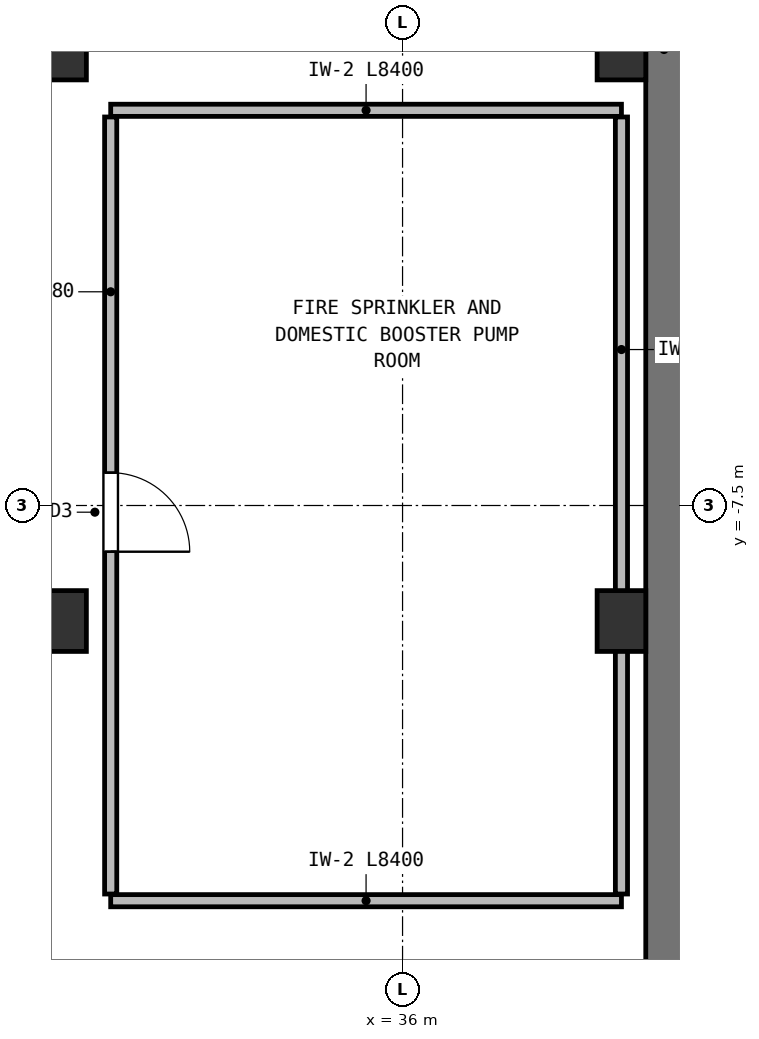
"""IFC4 building model, lengths in metres.
Left out: names, types, materials, properties, quantities, classifications, styles, units other than length and angle.
Written with IfcOpenShell. Run it as: python <this file> out.ifc"""

import sys

from ifc_helpers import new_model, si_unit, direction, frame, frame_2d, origin, origin_2d, place, context, subcontext, project, spatial, rectangle, extrude, element, fill, save


model = new_model("IFC4")
c1 = context("Model", 3, precision=1e-05, world=origin(), true_north=direction((0.0, 1.0)))
c2 = subcontext(c1, "Body", "Model", "MODEL_VIEW")
j1 = project(units=[si_unit("LENGTHUNIT", "METRE"), si_unit("PLANEANGLEUNIT", "RADIAN")], contexts=[c1])
p1 = place(None, origin())
s1 = spatial("IfcSite", under=j1, at=p1, CompositionType="ELEMENT")
p2 = place(p1, origin())
s2 = spatial("IfcBuilding", under=s1, at=p2, CompositionType="ELEMENT")
p3 = place(p2, frame((0.0, 0.0, -13.5)))
s3 = spatial("IfcBuildingStorey", under=s2, at=p3, CompositionType="ELEMENT", Elevation=-13.5)
p4 = place(p3, frame((40.3, -22.2, 0.0), z_axis=(0.0, 0.0, 1.0), x_axis=(0.0, 1.0, 0.0)))
e1 = element("IfcWall", 1, at=p4, inside=s3, PredefinedType="SOLIDWALL", context=c2, shape_type="SweptSolid", body=[
    extrude(rectangle(XDim=44.4, YDim=0.6, at=frame_2d((22.2, 0.0))), origin(), (0.0, 0.0, 1.0), 4.2),
])
for number, where, z_axis, x_axis in (
    (2, (30.4, -9.4, 0.0), (0.0, 0.0, 1.0), (1.0, 0.0, 0.0)),
    (3, (30.4, 0.0, 0.0), (0.0, 0.0, 1.0), (1.0, 0.0, 0.0)),
    (4, (39.6, -9.4, 0.0), (0.0, 0.0, 1.0), (1.0, 0.0, 0.0)),
    (5, (39.6, 0.0, 0.0), (0.0, 0.0, 1.0), (1.0, 0.0, 0.0)),
):
    element("IfcColumn", number, at=place(p3, frame(where, z_axis=z_axis, x_axis=x_axis)), inside=s3, PredefinedType="COLUMN", context=c2, shape_type="SweptSolid", body=[
        extrude(rectangle(XDim=0.8, YDim=1.0, at=origin_2d()), origin(), (0.0, 0.0, 1.0), 4.5),
    ])
for number, where, z_axis, x_axis in (
    (6, (31.2, -1.0, 0.0), (0.0, 0.0, 1.0), (1.0, 0.0, 0.0)),
    (7, (31.2, -14.0, 0.0), (0.0, 0.0, 1.0), (1.0, 0.0, 0.0)),
):
    element("IfcWall", number, at=place(p3, frame(where, z_axis=z_axis, x_axis=x_axis)), inside=s3, PredefinedType="PARTITIONING", context=c2, shape_type="SweptSolid", body=[
        extrude(rectangle(XDim=8.4, YDim=0.2, at=frame_2d((4.2, 0.0))), origin(), (0.0, 0.0, 1.0), 4.2),
    ])
p5 = place(p3, frame((31.2, -1.11, 0.0), z_axis=(0.0, 0.0, 1.0), x_axis=(0.0, -1.0, 0.0)))
e8 = element("IfcWall", 8, at=p5, inside=s3, PredefinedType="PARTITIONING", context=c2, shape_type="SweptSolid", body=[
    extrude(rectangle(XDim=12.78, YDim=0.2, at=frame_2d((6.39, 0.0))), origin(), (0.0, 0.0, 1.0), 4.2),
])
p6 = place(p5, frame((5.85, 0.0, 0.0)))
e9 = element("IfcOpeningElement", 9, at=p6, cuts=e8, PredefinedType="OPENING", context=c2, shape_type="SweptSolid", body=[
    extrude(rectangle(XDim=1.3, YDim=2.15, at=frame_2d((0.65, 1.075))), frame((0.0, 0.11, 0.0), z_axis=(0.0, -1.0, 0.0), x_axis=(1.0, 0.0, 0.0)), (0.0, 0.0, 1.0), 0.22),
])
p7 = place(p3, frame((39.6, -13.89, 0.0), z_axis=(0.0, 0.0, 1.0), x_axis=(0.0, 1.0, 0.0)))
e10 = element("IfcWall", 10, at=p7, inside=s3, PredefinedType="PARTITIONING", context=c2, shape_type="SweptSolid", body=[
    extrude(rectangle(XDim=12.78, YDim=0.2, at=frame_2d((6.39, 0.0))), origin(), (0.0, 0.0, 1.0), 3.18),
])
p8 = place(p6, origin())
e11 = element("IfcDoor", 11, at=p8, inside=s3, OperationType="SINGLE_SWING_RIGHT", PredefinedType="DOOR", context=c2, shape_type="SweptSolid", body=[
    extrude(rectangle(XDim=1.3, YDim=2.15, at=frame_2d((0.65, 1.075))), frame((0.0, 0.025, 0.0), z_axis=(0.0, -1.0, 0.0), x_axis=(1.0, 0.0, 0.0)), (0.0, 0.0, 1.0), 0.05),
])
fill(e9, e11)
save(model, sys.argv[1])
